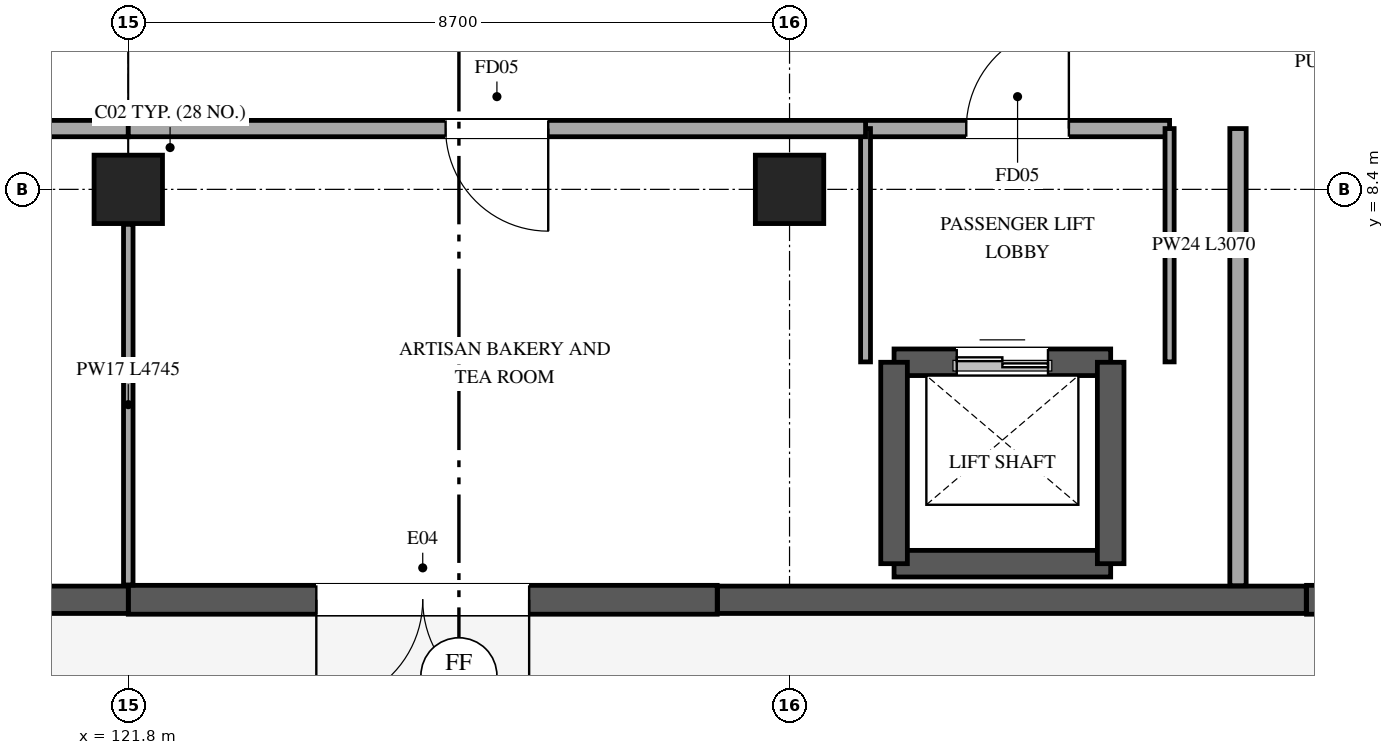
"""IFC4 building model, lengths in metres.
Left out: names, types, materials, properties, quantities, classifications, styles, units other than length and angle.
Written with IfcOpenShell. Run it as: python <this file> out.ifc"""

import sys

from ifc_helpers import new_model, si_unit, direction, frame, frame_2d, origin, origin_2d, place, context, subcontext, project, spatial, rectangle, extrude, element, fill, save


model = new_model("IFC4")
c1 = context("Model", 3, precision=1e-05, world=origin(), true_north=direction((0.0, 1.0)))
c2 = subcontext(c1, "Body", "Model", "MODEL_VIEW")
j1 = project(units=[si_unit("LENGTHUNIT", "METRE"), si_unit("PLANEANGLEUNIT", "RADIAN")], contexts=[c1])
p1 = place(None, origin())
s1 = spatial("IfcSite", under=j1, at=p1, CompositionType="ELEMENT")
p2 = place(p1, origin())
s2 = spatial("IfcBuilding", under=s1, at=p2, CompositionType="ELEMENT")
p3 = place(p2, origin())
s3 = spatial("IfcBuildingStorey", under=s2, at=p3, CompositionType="ELEMENT", Elevation=0.0)
for number, where, z_axis, x_axis in (
    (1, (121.8, 8.4, 0.0), (0.0, 0.0, 1.0), (1.0, 0.0, 0.0)),
    (2, (130.5, 8.4, 0.0), (0.0, 0.0, 1.0), (1.0, 0.0, 0.0)),
):
    element("IfcColumn", number, at=place(p3, frame(where, z_axis=z_axis, x_axis=x_axis)), inside=s3, PredefinedType="COLUMN", context=c2, shape_type="SweptSolid", body=[
        extrude(rectangle(XDim=0.9, YDim=0.9, at=origin_2d()), origin(), (0.0, 0.0, 1.0), 6.0),
    ])
p4 = place(p3, frame((145.048, 3.0, 0.0), z_axis=(0.0, 0.0, 1.0), x_axis=(-1.0, 0.0, 0.0)))
e3 = element("IfcWall", 3, at=p4, inside=s3, PredefinedType="STANDARD", context=c2, shape_type="SweptSolid", body=[
    extrude(rectangle(XDim=7.746, YDim=0.38, at=frame_2d((3.873, 0.0))), origin(), (0.0, 0.0, 1.0), 5.66),
])
p5 = place(p4, frame((0.25, 0.0, 0.0)))
e4 = element("IfcOpeningElement", 4, at=p5, cuts=e3, PredefinedType="OPENING", context=c2, shape_type="SweptSolid", body=[
    extrude(rectangle(XDim=3.2, YDim=2.4, at=frame_2d((1.6, 1.2))), frame((0.0, 0.2, 0.0), z_axis=(0.0, -1.0, 0.0), x_axis=(1.0, 0.0, 0.0)), (0.0, 0.0, 1.0), 0.4),
])
p6 = place(p3, frame((137.298, 3.0, 0.0), z_axis=(0.0, 0.0, 1.0), x_axis=(-1.0, 0.0, 0.0)))
e5 = element("IfcWall", 5, at=p6, inside=s3, PredefinedType="STANDARD", context=c2, shape_type="SweptSolid", body=[
    extrude(rectangle(XDim=7.746, YDim=0.36, at=frame_2d((3.873, 0.0))), origin(), (0.0, 0.0, 1.0), 5.66),
])
p7 = place(p3, frame((129.548, 3.0, 0.0), z_axis=(0.0, 0.0, 1.0), x_axis=(-1.0, 0.0, 0.0)))
e6 = element("IfcWall", 6, at=p7, inside=s3, PredefinedType="STANDARD", context=c2, shape_type="SweptSolid", body=[
    extrude(rectangle(XDim=7.748, YDim=0.38, at=frame_2d((3.874, 0.0))), origin(), (0.0, 0.0, 1.0), 5.66),
])
p8 = place(p7, frame((2.474, 0.0, 0.0)))
e7 = element("IfcOpeningElement", 7, at=p8, cuts=e6, PredefinedType="OPENING", context=c2, shape_type="SweptSolid", body=[
    extrude(rectangle(XDim=2.8, YDim=2.5, at=frame_2d((1.4, 1.25))), frame((0.0, 0.2, 0.0), z_axis=(0.0, -1.0, 0.0), x_axis=(1.0, 0.0, 0.0)), (0.0, 0.0, 1.0), 0.4),
])
p9 = place(p3, frame((121.8, 3.0, 0.0), z_axis=(0.0, 0.0, 1.0), x_axis=(-1.0, 0.0, 0.0)))
e8 = element("IfcWall", 8, at=p9, inside=s3, PredefinedType="STANDARD", context=c2, shape_type="SweptSolid", body=[
    extrude(rectangle(XDim=8.698, YDim=0.36, at=frame_2d((4.349, 0.0))), origin(), (0.0, 0.0, 1.0), 5.66),
])
p10 = place(p9, frame((4.649, 0.0, 0.0)))
e9 = element("IfcOpeningElement", 9, at=p10, cuts=e8, PredefinedType="OPENING", context=c2, shape_type="SweptSolid", body=[
    extrude(rectangle(XDim=3.4, YDim=2.8, at=frame_2d((1.7, 1.4))), frame((0.0, 0.19, 0.0), z_axis=(0.0, -1.0, 0.0), x_axis=(1.0, 0.0, 0.0)), (0.0, 0.0, 1.0), 0.38),
])
p11 = place(p3, frame((131.875, 6.125, 0.0), z_axis=(0.0, 0.0, 1.0), x_axis=(1.0, 0.0, 0.0)))
e10 = element("IfcWall", 10, at=p11, inside=s3, PredefinedType="SHEAR", context=c2, shape_type="SweptSolid", body=[
    extrude(rectangle(XDim=2.85, YDim=0.35, at=frame_2d((1.425, 0.0))), origin(), (0.0, 0.0, 1.0), 6.0),
])
p12 = place(p11, frame((0.825, 0.0, 0.0)))
e11 = element("IfcOpeningElement", 11, at=p12, cuts=e10, PredefinedType="OPENING", context=c2, shape_type="SweptSolid", body=[
    extrude(rectangle(XDim=1.2, YDim=2.2, at=frame_2d((0.6, 1.1))), frame((0.0, 0.185, 0.0), z_axis=(0.0, -1.0, 0.0), x_axis=(1.0, 0.0, 0.0)), (0.0, 0.0, 1.0), 0.37),
])
p13 = place(p3, frame((134.725, 3.475, 0.0), z_axis=(0.0, 0.0, 1.0), x_axis=(-1.0, 0.0, 0.0)))
e12 = element("IfcWall", 12, at=p13, inside=s3, PredefinedType="SHEAR", context=c2, shape_type="SweptSolid", body=[
    extrude(rectangle(XDim=2.85, YDim=0.35, at=frame_2d((1.425, 0.0))), origin(), (0.0, 0.0, 1.0), 6.0),
])
for number, where, z_axis, x_axis in (
    (13, (131.875, 3.475, 0.0), (0.0, 0.0, 1.0), (0.0, 1.0, 0.0)),
    (14, (134.725, 6.125, 0.0), (0.0, 0.0, 1.0), (0.0, -1.0, 0.0)),
):
    element("IfcWall", number, at=place(p3, frame(where, z_axis=z_axis, x_axis=x_axis)), inside=s3, PredefinedType="SHEAR", context=c2, shape_type="SweptSolid", body=[
        extrude(rectangle(XDim=2.65, YDim=0.35, at=frame_2d((1.325, 0.0))), origin(), (0.0, 0.0, 1.0), 6.0),
    ])
p14 = place(p3, frame((131.5, 9.2, 0.0), z_axis=(0.0, 0.0, 1.0), x_axis=(1.0, 0.0, 0.0)))
e15 = element("IfcWall", 15, at=p14, inside=s3, PredefinedType="PARTITIONING", context=c2, shape_type="SweptSolid", body=[
    extrude(rectangle(XDim=4.0, YDim=0.215, at=frame_2d((2.0, 0.0))), origin(), (0.0, 0.0, 1.0), 5.66),
])
p15 = place(p14, frame((1.325, 0.0, 0.0)))
e16 = element("IfcOpeningElement", 16, at=p15, cuts=e15, PredefinedType="OPENING", context=c2, shape_type="SweptSolid", body=[
    extrude(rectangle(XDim=1.35, YDim=2.2, at=frame_2d((0.675, 1.1))), frame((0.0, 0.118, 0.0), z_axis=(0.0, -1.0, 0.0), x_axis=(1.0, 0.0, 0.0)), (0.0, 0.0, 1.0), 0.235),
])
p16 = place(p3, frame((131.5, 6.13, 0.0), z_axis=(0.0, 0.0, 1.0), x_axis=(0.0, 1.0, 0.0)))
e17 = element("IfcWall", 17, at=p16, inside=s3, PredefinedType="PARTITIONING", context=c2, shape_type="SweptSolid", body=[
    extrude(rectangle(XDim=3.07, YDim=0.13, at=frame_2d((1.535, 0.0))), origin(), (0.0, 0.0, 1.0), 4.895),
])
p17 = place(p3, frame((135.5, 9.2, 0.0), z_axis=(0.0, 0.0, 1.0), x_axis=(0.0, -1.0, 0.0)))
e18 = element("IfcWall", 18, at=p17, inside=s3, PredefinedType="PARTITIONING", context=c2, shape_type="SweptSolid", body=[
    extrude(rectangle(XDim=3.07, YDim=0.12, at=frame_2d((1.535, 0.0))), origin(), (0.0, 0.0, 1.0), 4.895),
])
p18 = place(p3, frame((121.8, 9.2, 0.0), z_axis=(0.0, 0.0, 1.0), x_axis=(-1.0, 0.0, 0.0)))
e19 = element("IfcWall", 19, at=p18, inside=s3, PredefinedType="PARTITIONING", context=c2, shape_type="SweptSolid", body=[
    extrude(rectangle(XDim=4.2, YDim=0.215, at=frame_2d((2.1, 0.0))), origin(), (0.0, 0.0, 1.0), 4.91),
])
p19 = place(p3, frame((131.5, 9.2, 0.0), z_axis=(0.0, 0.0, 1.0), x_axis=(-1.0, 0.0, 0.0)))
e20 = element("IfcWall", 20, at=p19, inside=s3, PredefinedType="PARTITIONING", context=c2, shape_type="SweptSolid", body=[
    extrude(rectangle(XDim=9.7, YDim=0.215, at=frame_2d((4.85, 0.0))), origin(), (0.0, 0.0, 1.0), 4.895),
])
p20 = place(p19, frame((4.175, 0.0, 0.0)))
e21 = element("IfcOpeningElement", 21, at=p20, cuts=e20, PredefinedType="OPENING", context=c2, shape_type="SweptSolid", body=[
    extrude(rectangle(XDim=1.35, YDim=2.2, at=frame_2d((0.675, 1.1))), frame((0.0, 0.118, 0.0), z_axis=(0.0, -1.0, 0.0), x_axis=(1.0, 0.0, 0.0)), (0.0, 0.0, 1.0), 0.235),
])
p21 = place(p3, frame((136.4, 3.185, 0.0), z_axis=(0.0, 0.0, 1.0), x_axis=(0.0, 1.0, 0.0)))
e22 = element("IfcWall", 22, at=p21, inside=s3, PredefinedType="PARTITIONING", context=c2, shape_type="SweptSolid", body=[
    extrude(rectangle(XDim=6.015, YDim=0.215, at=frame_2d((3.007, 0.0))), origin(), (0.0, 0.0, 1.0), 4.895),
])
p22 = place(p3, frame((121.8, 7.94, 0.0), z_axis=(0.0, 0.0, 1.0), x_axis=(0.0, -1.0, 0.0)))
e23 = element("IfcWall", 23, at=p22, inside=s3, PredefinedType="PARTITIONING", context=c2, shape_type="SweptSolid", body=[
    extrude(rectangle(XDim=4.745, YDim=0.125, at=frame_2d((2.373, 0.0))), origin(), (0.0, 0.0, 1.0), 4.91),
])
p23 = place(p8, origin())
e24 = element("IfcDoor", 24, at=p23, inside=s3, OperationType="DOUBLE_DOOR_SINGLE_SWING", PredefinedType="DOOR", context=c2, shape_type="SweptSolid", body=[
    extrude(rectangle(XDim=2.8, YDim=2.5, at=frame_2d((1.4, 1.25))), frame((0.0, 0.025, 0.0), z_axis=(0.0, -1.0, 0.0), x_axis=(1.0, 0.0, 0.0)), (0.0, 0.0, 1.0), 0.05),
])
fill(e7, e24)
p24 = place(p12, origin())
e25 = element("IfcDoor", 25, at=p24, inside=s3, OperationType="DOUBLE_DOOR_SLIDING", PredefinedType="DOOR", context=c2, shape_type="SweptSolid", body=[
    extrude(rectangle(XDim=1.2, YDim=2.2, at=frame_2d((0.6, 1.1))), frame((0.0, 0.025, 0.0), z_axis=(0.0, -1.0, 0.0), x_axis=(1.0, 0.0, 0.0)), (0.0, 0.0, 1.0), 0.05),
])
fill(e11, e25)
p25 = place(p15, origin())
e26 = element("IfcDoor", 26, at=p25, inside=s3, OperationType="SINGLE_SWING_RIGHT", PredefinedType="DOOR", context=c2, shape_type="SweptSolid", body=[
    extrude(rectangle(XDim=1.35, YDim=2.2, at=frame_2d((0.675, 1.1))), frame((0.0, 0.025, 0.0), z_axis=(0.0, -1.0, 0.0), x_axis=(1.0, 0.0, 0.0)), (0.0, 0.0, 1.0), 0.05),
])
fill(e16, e26)
p26 = place(p20, origin())
e27 = element("IfcDoor", 27, at=p26, inside=s3, OperationType="SINGLE_SWING_LEFT", PredefinedType="DOOR", context=c2, shape_type="SweptSolid", body=[
    extrude(rectangle(XDim=1.35, YDim=2.2, at=frame_2d((0.675, 1.1))), frame((0.0, 0.025, 0.0), z_axis=(0.0, -1.0, 0.0), x_axis=(1.0, 0.0, 0.0)), (0.0, 0.0, 1.0), 0.05),
])
fill(e21, e27)
save(model, sys.argv[1])
